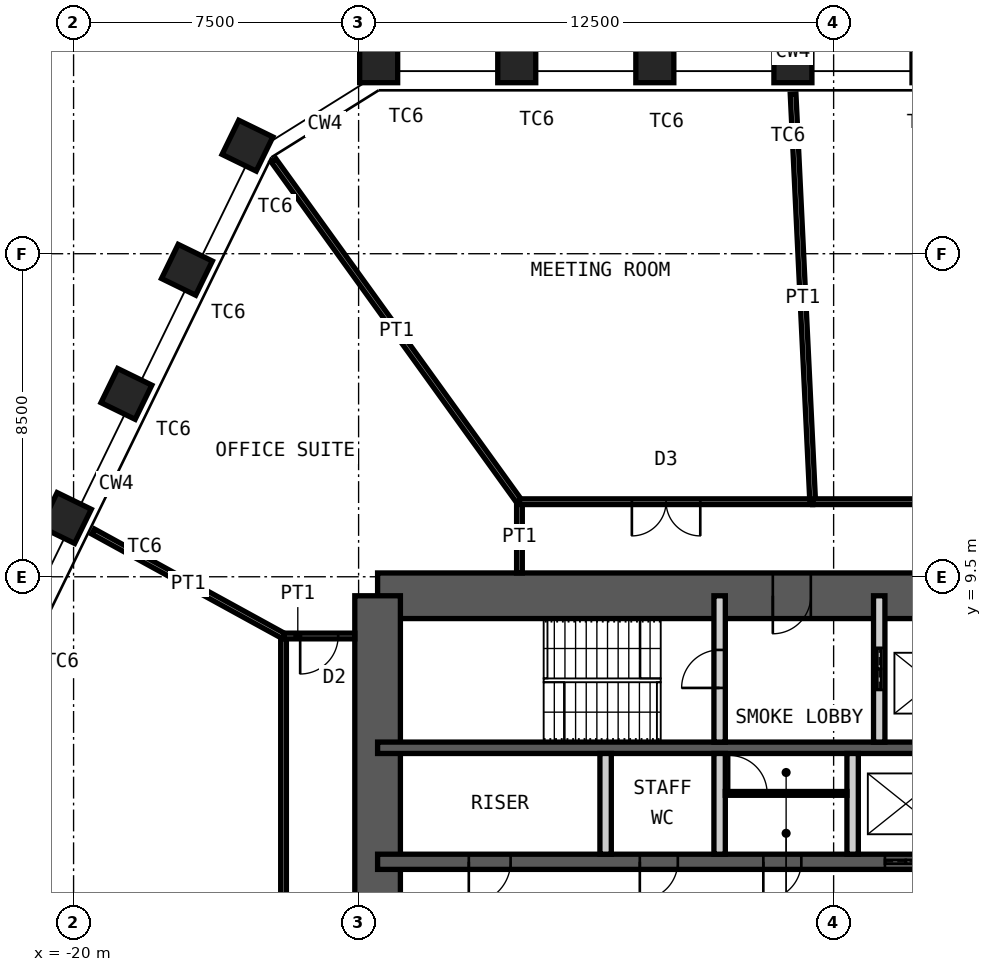
"""IFC4 building model, lengths in metres.
Left out: names, types, materials, properties, quantities, classifications, styles, units other than length and angle.
Written with IfcOpenShell. Run it as: python <this file> out.ifc"""

import sys

from ifc_helpers import new_model, si_unit, direction, frame, frame_2d, origin, origin_2d, place, context, subcontext, project, spatial, rectangle, hollow_rectangle, extrude, element, fill, save


model = new_model("IFC4")
c1 = context("Model", 3, precision=1e-05, world=origin(), true_north=direction((0.0, 1.0)))
c2 = subcontext(c1, "Body", "Model", "MODEL_VIEW")
j1 = project(units=[si_unit("LENGTHUNIT", "METRE"), si_unit("PLANEANGLEUNIT", "RADIAN")], contexts=[c1])
p1 = place(None, origin())
s1 = spatial("IfcSite", under=j1, at=p1, CompositionType="ELEMENT")
p2 = place(p1, origin())
s2 = spatial("IfcBuilding", under=s1, at=p2, CompositionType="ELEMENT")
p3 = place(p2, frame((0.0, 0.0, 226.6)))
s3 = spatial("IfcBuildingStorey", under=s2, at=p3, CompositionType="ELEMENT", Elevation=226.6)
for number, where, z_axis, x_axis in (
    (1, (-11.972, 23.0, 0.0), (0.0, 0.0, 1.0), (-1.0, 0.0, 0.0)),
    (2, (-8.338, 23.0, 0.0), (0.0, 0.0, 1.0), (-1.0, 0.0, 0.0)),
    (3, (-4.705, 23.0, 0.0), (0.0, 0.0, 1.0), (-1.0, 0.0, 0.0)),
    (4, (-1.071, 23.0, 0.0), (0.0, 0.0, 1.0), (-1.0, 0.0, 0.0)),
    (5, (-20.203, 11.045, 0.0), (0.0, 0.0, 1.0), (-0.438, -0.899, 0.0)),
    (6, (-18.61, 14.311, 0.0), (0.0, 0.0, 1.0), (-0.438, -0.899, 0.0)),
    (7, (-17.017, 17.577, 0.0), (0.0, 0.0, 1.0), (-0.438, -0.899, 0.0)),
    (8, (-15.424, 20.843, 0.0), (0.0, 0.0, 1.0), (-0.438, -0.899, 0.0)),
):
    element("IfcColumn", number, at=place(p3, frame(where, z_axis=z_axis, x_axis=x_axis)), inside=s3, PredefinedType="COLUMN", context=c2, shape_type="SweptSolid", body=[
        extrude(hollow_rectangle(XDim=1.0, YDim=1.0, WallThickness=0.06, at=origin_2d()), origin(), (0.0, 0.0, 1.0), 4.2),
    ])
p4 = place(p3, frame((-12.0, 9.0, 0.0), z_axis=(0.0, 0.0, 1.0), x_axis=(1.0, 0.0, 0.0)))
e9 = element("IfcWall", 9, at=p4, inside=s3, PredefinedType="SHEAR", context=c2, shape_type="SweptSolid", body=[
    extrude(rectangle(XDim=24.0, YDim=1.2, at=frame_2d((12.0, 0.0))), origin(), (0.0, 0.0, 1.0), 4.2),
])
p5 = place(p4, frame((10.4, 0.0, 0.0)))
e10 = element("IfcOpeningElement", 10, at=p5, cuts=e9, PredefinedType="OPENING", context=c2, shape_type="SweptSolid", body=[
    extrude(rectangle(XDim=1.0, YDim=2.1, at=frame_2d((0.5, 1.05))), frame((0.0, 0.61, 0.0), z_axis=(0.0, -1.0, 0.0), x_axis=(1.0, 0.0, 0.0)), (0.0, 0.0, 1.0), 1.22),
])
p6 = place(p4, frame((17.6, 0.0, 0.0)))
e11 = element("IfcOpeningElement", 11, at=p6, cuts=e9, PredefinedType="OPENING", context=c2, shape_type="SweptSolid", body=[
    extrude(rectangle(XDim=0.9, YDim=2.1, at=frame_2d((0.45, 1.05))), frame((0.0, 0.61, 0.0), z_axis=(0.0, -1.0, 0.0), x_axis=(1.0, 0.0, 0.0)), (0.0, 0.0, 1.0), 1.22),
])
p7 = place(p4, frame((21.9, 0.0, 0.0)))
e12 = element("IfcOpeningElement", 12, at=p7, cuts=e9, PredefinedType="OPENING", context=c2, shape_type="SweptSolid", body=[
    extrude(rectangle(XDim=0.9, YDim=2.1, at=frame_2d((0.45, 1.05))), frame((0.0, 0.61, 0.0), z_axis=(0.0, -1.0, 0.0), x_axis=(1.0, 0.0, 0.0)), (0.0, 0.0, 1.0), 1.22),
])
p8 = place(p3, frame((-12.0, -9.0, 0.0), z_axis=(0.0, 0.0, 1.0), x_axis=(0.0, 1.0, 0.0)))
e13 = element("IfcWall", 13, at=p8, inside=s3, PredefinedType="SHEAR", context=c2, shape_type="SweptSolid", body=[
    extrude(rectangle(XDim=18.0, YDim=1.2, at=frame_2d((9.0, 0.0))), origin(), (0.0, 0.0, 1.0), 4.2),
])
p9 = place(p8, frame((8.1, 0.0, 0.0)))
e14 = element("IfcOpeningElement", 14, at=p9, cuts=e13, PredefinedType="OPENING", context=c2, shape_type="SweptSolid", body=[
    extrude(rectangle(XDim=1.8, YDim=2.1, at=frame_2d((0.9, 1.05))), frame((0.0, 0.61, 0.0), z_axis=(0.0, -1.0, 0.0), x_axis=(1.0, 0.0, 0.0)), (0.0, 0.0, 1.0), 1.22),
])
p10 = place(p3, frame((-12.0, 5.0, 0.0), z_axis=(0.0, 0.0, 1.0), x_axis=(1.0, 0.0, 0.0)))
e15 = element("IfcWall", 15, at=p10, inside=s3, PredefinedType="SHEAR", context=c2, shape_type="SweptSolid", body=[
    extrude(rectangle(XDim=24.0, YDim=0.3, at=frame_2d((12.0, 0.0))), origin(), (0.0, 0.0, 1.0), 4.2),
])
p11 = place(p3, frame((-12.0, 2.0, 0.0), z_axis=(0.0, 0.0, 1.0), x_axis=(1.0, 0.0, 0.0)))
e16 = element("IfcWall", 16, at=p11, inside=s3, PredefinedType="SHEAR", context=c2, shape_type="SweptSolid", body=[
    extrude(rectangle(XDim=24.0, YDim=0.4, at=frame_2d((12.0, 0.0))), origin(), (0.0, 0.0, 1.0), 4.2),
])
p12 = place(p11, frame((2.4, 0.0, 0.0)))
e17 = element("IfcOpeningElement", 17, at=p12, cuts=e16, PredefinedType="OPENING", context=c2, shape_type="SweptSolid", body=[
    extrude(rectangle(XDim=1.1, YDim=2.1, at=frame_2d((0.55, 1.05))), frame((0.0, 0.21, 0.0), z_axis=(0.0, -1.0, 0.0), x_axis=(1.0, 0.0, 0.0)), (0.0, 0.0, 1.0), 0.42),
])
p13 = place(p11, frame((22.0, 0.0, 0.0)))
e18 = element("IfcOpeningElement", 18, at=p13, cuts=e16, PredefinedType="OPENING", context=c2, shape_type="SweptSolid", body=[
    extrude(rectangle(XDim=1.1, YDim=2.1, at=frame_2d((0.55, 1.05))), frame((0.0, 0.21, 0.0), z_axis=(0.0, -1.0, 0.0), x_axis=(1.0, 0.0, 0.0)), (0.0, 0.0, 1.0), 0.42),
])
p14 = place(p11, frame((10.15, 0.0, 0.0)))
e19 = element("IfcOpeningElement", 19, at=p14, cuts=e16, PredefinedType="OPENING", context=c2, shape_type="SweptSolid", body=[
    extrude(rectangle(XDim=1.0, YDim=2.1, at=frame_2d((0.5, 1.05))), frame((0.0, 0.21, 0.0), z_axis=(0.0, -1.0, 0.0), x_axis=(1.0, 0.0, 0.0)), (0.0, 0.0, 1.0), 0.42),
])
p15 = place(p11, frame((6.9, 0.0, 0.0)))
e20 = element("IfcOpeningElement", 20, at=p15, cuts=e16, PredefinedType="OPENING", context=c2, shape_type="SweptSolid", body=[
    extrude(rectangle(XDim=1.0, YDim=2.1, at=frame_2d((0.5, 1.05))), frame((0.0, 0.21, 0.0), z_axis=(0.0, -1.0, 0.0), x_axis=(1.0, 0.0, 0.0)), (0.0, 0.0, 1.0), 0.42),
])
p16 = place(p11, frame((13.35, 0.0, 0.0)))
e21 = element("IfcOpeningElement", 21, at=p16, cuts=e16, PredefinedType="OPENING", context=c2, shape_type="SweptSolid", body=[
    extrude(rectangle(XDim=1.1, YDim=2.4, at=frame_2d((0.55, 1.2))), frame((0.0, 0.21, 0.0), z_axis=(0.0, -1.0, 0.0), x_axis=(1.0, 0.0, 0.0)), (0.0, 0.0, 1.0), 0.42),
])
p17 = place(p11, frame((16.15, 0.0, 0.0)))
e22 = element("IfcOpeningElement", 22, at=p17, cuts=e16, PredefinedType="OPENING", context=c2, shape_type="SweptSolid", body=[
    extrude(rectangle(XDim=1.1, YDim=2.4, at=frame_2d((0.55, 1.2))), frame((0.0, 0.21, 0.0), z_axis=(0.0, -1.0, 0.0), x_axis=(1.0, 0.0, 0.0)), (0.0, 0.0, 1.0), 0.42),
])
p18 = place(p11, frame((18.95, 0.0, 0.0)))
e23 = element("IfcOpeningElement", 23, at=p18, cuts=e16, PredefinedType="OPENING", context=c2, shape_type="SweptSolid", body=[
    extrude(rectangle(XDim=1.1, YDim=2.4, at=frame_2d((0.55, 1.2))), frame((0.0, 0.21, 0.0), z_axis=(0.0, -1.0, 0.0), x_axis=(1.0, 0.0, 0.0)), (0.0, 0.0, 1.0), 0.42),
])
p19 = place(p3, frame((-3.0, 5.15, 0.0), z_axis=(0.0, 0.0, 1.0), x_axis=(0.0, 1.0, 0.0)))
e24 = element("IfcWall", 24, at=p19, inside=s3, PredefinedType="PARTITIONING", context=c2, shape_type="SweptSolid", body=[
    extrude(rectangle(XDim=3.85, YDim=0.3, at=frame_2d((1.925, 0.0))), origin(), (0.0, 0.0, 1.0), 3.98),
])
p20 = place(p19, frame((1.425, 0.0, 0.0)))
e25 = element("IfcOpeningElement", 25, at=p20, cuts=e24, PredefinedType="OPENING", context=c2, shape_type="SweptSolid", body=[
    extrude(rectangle(XDim=1.0, YDim=2.1, at=frame_2d((0.5, 1.05))), frame((0.0, 0.16, 0.0), z_axis=(0.0, -1.0, 0.0), x_axis=(1.0, 0.0, 0.0)), (0.0, 0.0, 1.0), 0.32),
])
p21 = place(p3, frame((1.2, 5.15, 0.0), z_axis=(0.0, 0.0, 1.0), x_axis=(0.0, 1.0, 0.0)))
e26 = element("IfcWall", 26, at=p21, inside=s3, PredefinedType="PARTITIONING", context=c2, shape_type="SweptSolid", body=[
    extrude(rectangle(XDim=3.85, YDim=0.3, at=frame_2d((1.925, 0.0))), origin(), (0.0, 0.0, 1.0), 3.98),
])
p22 = place(p21, frame((1.375, 0.0, 0.0)))
e27 = element("IfcOpeningElement", 27, at=p22, cuts=e26, PredefinedType="OPENING", context=c2, shape_type="SweptSolid", body=[
    extrude(rectangle(XDim=1.1, YDim=2.4, at=frame_2d((0.55, 1.2))), frame((0.0, 0.16, 0.0), z_axis=(0.0, -1.0, 0.0), x_axis=(1.0, 0.0, 0.0)), (0.0, 0.0, 1.0), 0.32),
])
for number, where, z_axis, x_axis in (
    (28, (-6.0, 2.2, 0.0), (0.0, 0.0, 1.0), (0.0, 1.0, 0.0)),
    (29, (-3.0, 2.2, 0.0), (0.0, 0.0, 1.0), (0.0, 1.0, 0.0)),
    (30, (0.5, 2.2, 0.0), (0.0, 0.0, 1.0), (0.0, 1.0, 0.0)),
):
    element("IfcWall", number, at=place(p3, frame(where, z_axis=z_axis, x_axis=x_axis)), inside=s3, PredefinedType="PARTITIONING", context=c2, shape_type="SweptSolid", body=[
        extrude(rectangle(XDim=2.65, YDim=0.3, at=frame_2d((1.325, 0.0))), origin(), (0.0, 0.0, 1.0), 3.98),
    ])
p23 = place(p3, frame((-2.85, 3.8, 0.0), z_axis=(0.0, 0.0, 1.0), x_axis=(1.0, 0.0, 0.0)))
e31 = element("IfcWall", 31, at=p23, inside=s3, PredefinedType="PARTITIONING", context=c2, shape_type="SweptSolid", body=[
    extrude(rectangle(XDim=3.2, YDim=0.1, at=frame_2d((1.6, 0.0))), origin(), (0.0, 0.0, 1.0), 3.98),
])
p24 = place(p23, frame((0.1, 0.0, 0.0)))
e32 = element("IfcOpeningElement", 32, at=p24, cuts=e31, PredefinedType="OPENING", context=c2, shape_type="SweptSolid", body=[
    extrude(rectangle(XDim=1.0, YDim=2.4, at=frame_2d((0.5, 1.2))), frame((0.0, 0.06, 0.0), z_axis=(0.0, -1.0, 0.0), x_axis=(1.0, 0.0, 0.0)), (0.0, 0.0, 1.0), 0.12),
])
p25 = place(p3, frame((-14.475, -9.311, 0.0), z_axis=(0.0, 0.0, 1.0), x_axis=(0.0, 1.0, 0.0)))
e33 = element("IfcWall", 33, at=p25, inside=s3, PredefinedType="PARTITIONING", context=c2, shape_type="SweptSolid", body=[
    extrude(rectangle(XDim=17.252, YDim=0.15, at=frame_2d((8.626, 0.0))), origin(), (0.0, 0.0, 1.0), 4.03),
])
p26 = place(p25, frame((7.726, 0.0, 0.0)))
e34 = element("IfcOpeningElement", 34, at=p26, cuts=e33, PredefinedType="OPENING", context=c2, shape_type="SweptSolid", body=[
    extrude(rectangle(XDim=1.8, YDim=2.4, at=frame_2d((0.9, 1.2))), frame((0.0, 0.085, 0.0), z_axis=(0.0, -1.0, 0.0), x_axis=(1.0, 0.0, 0.0)), (0.0, 0.0, 1.0), 0.17),
])
p27 = place(p3, frame((-19.486, 10.69, 0.0), z_axis=(0.0, 0.0, 1.0), x_axis=(0.876724089264, -0.480993629172, 0.0)))
e35 = element("IfcWall", 35, at=p27, inside=s3, PredefinedType="PARTITIONING", context=c2, shape_type="SweptSolid", body=[
    extrude(rectangle(XDim=5.715, YDim=0.15, at=frame_2d((2.858, 0.0))), origin(), (0.0, 0.0, 1.0), 3.43),
])
p28 = place(p3, frame((-14.475, 7.941, 0.0), z_axis=(0.0, 0.0, 1.0), x_axis=(1.0, 0.0, 0.0)))
e36 = element("IfcWall", 36, at=p28, inside=s3, PredefinedType="PARTITIONING", context=c2, shape_type="SweptSolid", body=[
    extrude(rectangle(XDim=1.875, YDim=0.15, at=frame_2d((0.938, 0.0))), origin(), (0.0, 0.0, 1.0), 4.03),
])
p29 = place(p28, frame((0.438, 0.0, 0.0)))
e37 = element("IfcOpeningElement", 37, at=p29, cuts=e36, PredefinedType="OPENING", context=c2, shape_type="SweptSolid", body=[
    extrude(rectangle(XDim=1.0, YDim=2.4, at=frame_2d((0.5, 1.2))), frame((0.0, 0.085, 0.0), z_axis=(0.0, -1.0, 0.0), x_axis=(1.0, 0.0, 0.0)), (0.0, 0.0, 1.0), 0.17),
])
p30 = place(p3, frame((-8.267, 9.6, 0.0), z_axis=(0.0, 0.0, 1.0), x_axis=(0.0, 1.0, 0.0)))
e38 = element("IfcWall", 38, at=p30, inside=s3, PredefinedType="PARTITIONING", context=c2, shape_type="SweptSolid", body=[
    extrude(rectangle(XDim=1.875, YDim=0.15, at=frame_2d((0.938, 0.0))), origin(), (0.0, 0.0, 1.0), 4.03),
])
p31 = place(p3, frame((-14.737, 20.455, 0.0), z_axis=(0.0, 0.0, 1.0), x_axis=(0.584547025688, -0.811359830629, 0.0)))
e39 = element("IfcWall", 39, at=p31, inside=s3, PredefinedType="PARTITIONING", context=c2, shape_type="SweptSolid", body=[
    extrude(rectangle(XDim=11.068, YDim=0.15, at=frame_2d((5.534, 0.0))), origin(), (0.0, 0.0, 1.0), 2.93),
])
p32 = place(p3, frame((-8.267, 11.475, 0.0), z_axis=(0.0, 0.0, 1.0), x_axis=(1.0, 0.0, 0.0)))
e40 = element("IfcWall", 40, at=p32, inside=s3, PredefinedType="PARTITIONING", context=c2, shape_type="SweptSolid", body=[
    extrude(rectangle(XDim=7.716, YDim=0.15, at=frame_2d((3.858, 0.0))), origin(), (0.0, 0.0, 1.0), 4.03),
])
p33 = place(p32, frame((2.958, 0.0, 0.0)))
e41 = element("IfcOpeningElement", 41, at=p33, cuts=e40, PredefinedType="OPENING", context=c2, shape_type="SweptSolid", body=[
    extrude(rectangle(XDim=1.8, YDim=2.4, at=frame_2d((0.9, 1.2))), frame((0.0, 0.085, 0.0), z_axis=(0.0, -1.0, 0.0), x_axis=(1.0, 0.0, 0.0)), (0.0, 0.0, 1.0), 0.17),
])
p34 = place(p3, frame((-1.067, 22.2, 0.0), z_axis=(0.0, 0.0, 1.0), x_axis=(0.047998335863, -0.998847415652, 0.0)))
e42 = element("IfcWall", 42, at=p34, inside=s3, PredefinedType="PARTITIONING", context=c2, shape_type="SweptSolid", body=[
    extrude(rectangle(XDim=10.738, YDim=0.15, at=frame_2d((5.369, 0.0))), origin(), (0.0, 0.0, 1.0), 3.43),
])
p35 = place(p3, frame((-0.551, 11.475, 0.0), z_axis=(0.0, 0.0, 1.0), x_axis=(1.0, 0.0, 0.0)))
e43 = element("IfcWall", 43, at=p35, inside=s3, PredefinedType="PARTITIONING", context=c2, shape_type="SweptSolid", body=[
    extrude(rectangle(XDim=15.026, YDim=0.15, at=frame_2d((7.513, 0.0))), origin(), (0.0, 0.0, 1.0), 4.03),
])
p36 = place(p35, frame((6.613, 0.0, 0.0)))
e44 = element("IfcOpeningElement", 44, at=p36, cuts=e43, PredefinedType="OPENING", context=c2, shape_type="SweptSolid", body=[
    extrude(rectangle(XDim=1.8, YDim=2.4, at=frame_2d((0.9, 1.2))), frame((0.0, 0.085, 0.0), z_axis=(0.0, -1.0, 0.0), x_axis=(1.0, 0.0, 0.0)), (0.0, 0.0, 1.0), 0.17),
])
p37 = place(p5, origin())
e45 = element("IfcDoor", 45, at=p37, inside=s3, OperationType="SINGLE_SWING_LEFT", PredefinedType="DOOR", context=c2, shape_type="SweptSolid", body=[
    extrude(rectangle(XDim=1.0, YDim=2.1, at=frame_2d((0.5, 1.05))), frame((0.0, 0.025, 0.0), z_axis=(0.0, -1.0, 0.0), x_axis=(1.0, 0.0, 0.0)), (0.0, 0.0, 1.0), 0.05),
])
fill(e10, e45)
p38 = place(p20, origin())
e46 = element("IfcDoor", 46, at=p38, inside=s3, OperationType="SINGLE_SWING_RIGHT", PredefinedType="DOOR", context=c2, shape_type="SweptSolid", body=[
    extrude(rectangle(XDim=1.0, YDim=2.1, at=frame_2d((0.5, 1.05))), frame((0.0, 0.025, 0.0), z_axis=(0.0, -1.0, 0.0), x_axis=(1.0, 0.0, 0.0)), (0.0, 0.0, 1.0), 0.05),
])
fill(e25, e46)
p39 = place(p12, origin())
e47 = element("IfcDoor", 47, at=p39, inside=s3, OperationType="SINGLE_SWING_LEFT", PredefinedType="DOOR", context=c2, shape_type="SweptSolid", body=[
    extrude(rectangle(XDim=1.1, YDim=2.1, at=frame_2d((0.55, 1.05))), frame((0.0, 0.025, 0.0), z_axis=(0.0, -1.0, 0.0), x_axis=(1.0, 0.0, 0.0)), (0.0, 0.0, 1.0), 0.05),
])
fill(e17, e47)
p40 = place(p14, origin())
e48 = element("IfcDoor", 48, at=p40, inside=s3, OperationType="SINGLE_SWING_LEFT", PredefinedType="DOOR", context=c2, shape_type="SweptSolid", body=[
    extrude(rectangle(XDim=1.0, YDim=2.1, at=frame_2d((0.5, 1.05))), frame((0.0, 0.025, 0.0), z_axis=(0.0, -1.0, 0.0), x_axis=(1.0, 0.0, 0.0)), (0.0, 0.0, 1.0), 0.05),
])
fill(e19, e48)
p41 = place(p22, origin())
e49 = element("IfcDoor", 49, at=p41, inside=s3, OperationType="DOUBLE_DOOR_SLIDING", PredefinedType="DOOR", context=c2, shape_type="SweptSolid", body=[
    extrude(rectangle(XDim=1.1, YDim=2.4, at=frame_2d((0.55, 1.2))), frame((0.0, 0.025, 0.0), z_axis=(0.0, -1.0, 0.0), x_axis=(1.0, 0.0, 0.0)), (0.0, 0.0, 1.0), 0.05),
])
fill(e27, e49)
p42 = place(p15, origin())
e50 = element("IfcDoor", 50, at=p42, inside=s3, OperationType="SINGLE_SWING_LEFT", PredefinedType="DOOR", context=c2, shape_type="SweptSolid", body=[
    extrude(rectangle(XDim=1.0, YDim=2.1, at=frame_2d((0.5, 1.05))), frame((0.0, 0.025, 0.0), z_axis=(0.0, -1.0, 0.0), x_axis=(1.0, 0.0, 0.0)), (0.0, 0.0, 1.0), 0.05),
])
fill(e20, e50)
p43 = place(p16, origin())
e51 = element("IfcDoor", 51, at=p43, inside=s3, OperationType="DOUBLE_DOOR_SLIDING", PredefinedType="DOOR", context=c2, shape_type="SweptSolid", body=[
    extrude(rectangle(XDim=1.1, YDim=2.4, at=frame_2d((0.55, 1.2))), frame((0.0, 0.025, 0.0), z_axis=(0.0, -1.0, 0.0), x_axis=(1.0, 0.0, 0.0)), (0.0, 0.0, 1.0), 0.05),
])
fill(e21, e51)
p44 = place(p24, origin())
e52 = element("IfcDoor", 52, at=p44, inside=s3, OperationType="SINGLE_SWING_RIGHT", PredefinedType="DOOR", context=c2, shape_type="SweptSolid", body=[
    extrude(rectangle(XDim=1.0, YDim=2.4, at=frame_2d((0.5, 1.2))), frame((0.0, 0.025, 0.0), z_axis=(0.0, -1.0, 0.0), x_axis=(1.0, 0.0, 0.0)), (0.0, 0.0, 1.0), 0.05),
])
fill(e32, e52)
p45 = place(p29, origin())
e53 = element("IfcDoor", 53, at=p45, inside=s3, OperationType="SINGLE_SWING_LEFT", PredefinedType="DOOR", context=c2, shape_type="SweptSolid", body=[
    extrude(rectangle(XDim=1.0, YDim=2.4, at=frame_2d((0.5, 1.2))), frame((0.0, 0.025, 0.0), z_axis=(0.0, -1.0, 0.0), x_axis=(1.0, 0.0, 0.0)), (0.0, 0.0, 1.0), 0.05),
])
fill(e37, e53)
p46 = place(p33, origin())
e54 = element("IfcDoor", 54, at=p46, inside=s3, OperationType="DOUBLE_DOOR_DOUBLE_SWING", PredefinedType="DOOR", context=c2, shape_type="SweptSolid", body=[
    extrude(rectangle(XDim=1.8, YDim=2.4, at=frame_2d((0.9, 1.2))), frame((0.0, 0.025, 0.0), z_axis=(0.0, -1.0, 0.0), x_axis=(1.0, 0.0, 0.0)), (0.0, 0.0, 1.0), 0.05),
])
fill(e41, e54)
save(model, sys.argv[1])
